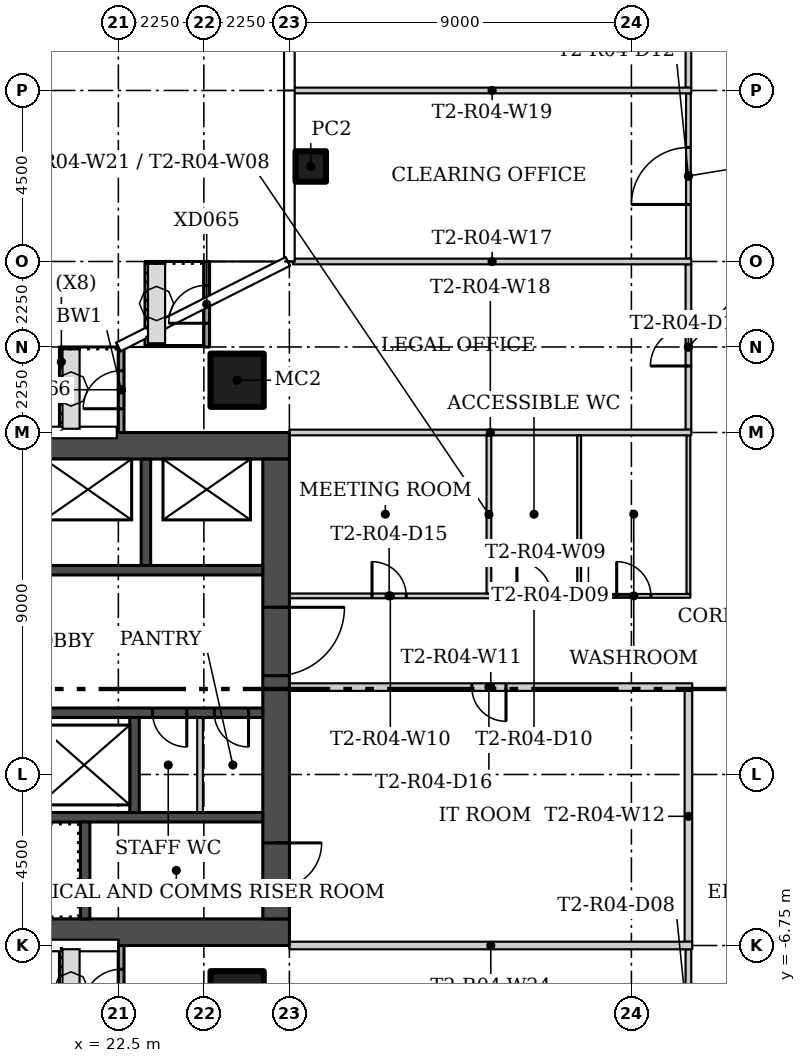
"""IFC4 building model, lengths in metres.
Left out: names, types, materials, properties, quantities, classifications, styles, units other than length and angle.
Written with IfcOpenShell. Run it as: python <this file> out.ifc"""

import sys

from ifc_helpers import new_model, si_unit, direction, frame, frame_2d, origin, origin_2d, place, context, subcontext, project, spatial, rectangle, hollow_rectangle, extrude, element, fill, save


model = new_model("IFC4")
c1 = context("Model", 3, precision=1e-05, world=origin(), true_north=direction((0.0, 1.0)))
c2 = subcontext(c1, "Body", "Model", "MODEL_VIEW")
j1 = project(units=[si_unit("LENGTHUNIT", "METRE"), si_unit("PLANEANGLEUNIT", "RADIAN")], contexts=[c1])
p1 = place(None, origin())
s1 = spatial("IfcSite", under=j1, at=p1, CompositionType="ELEMENT")
p2 = place(p1, origin())
s2 = spatial("IfcBuilding", under=s1, at=p2, CompositionType="ELEMENT")
p3 = place(p2, frame((0.0, 0.0, 53.7)))
s3 = spatial("IfcBuildingStorey", under=s2, at=p3, CompositionType="ELEMENT", Elevation=53.7)
for number, where in (
    (1, (25.625, 8.125, 0.0)),
    (2, (25.625, -8.125, 0.0)),
):
    element("IfcColumn", number, at=place(p3, frame(where)), inside=s3, PredefinedType="COLUMN", context=c2, shape_type="SweptSolid", body=[
        extrude(hollow_rectangle(XDim=1.4, YDim=1.4, WallThickness=0.05, at=origin_2d()), origin(), (0.0, 0.0, 1.0), 3.55),
    ])
p4 = place(p3, frame((27.562, 13.75, 0.0)))
e3 = element("IfcColumn", 3, at=p4, inside=s3, PredefinedType="COLUMN", context=c2, shape_type="SweptSolid", body=[
    extrude(hollow_rectangle(XDim=0.8, YDim=0.8, WallThickness=0.025, at=origin_2d()), origin(), (0.0, 0.0, 1.0), 3.55),
])
p5 = place(p3, frame((37.5, 15.825, 0.0), z_axis=(0.0, 0.0, 1.0), x_axis=(0.0, 1.0, 0.0)))
e4 = element("IfcWall", 4, at=p5, inside=s3, PredefinedType="PARTITIONING", context=c2, shape_type="SweptSolid", body=[
    extrude(rectangle(XDim=8.85, YDim=0.15, at=frame_2d((4.425, 0.0))), origin(), (0.0, 0.0, 1.0), 3.55),
])
p6 = place(p5, frame((3.925, 0.0, 0.0)))
e5 = element("IfcOpeningElement", 5, at=p6, cuts=e4, PredefinedType="OPENING", context=c2, shape_type="SweptSolid", body=[
    extrude(rectangle(XDim=1.0, YDim=2.4, at=frame_2d((0.5, 1.2))), frame((0.0, 0.085, 0.0), z_axis=(0.0, -1.0, 0.0), x_axis=(1.0, 0.0, 0.0)), (0.0, 0.0, 1.0), 0.17),
])
p7 = place(p3, frame((37.5, 6.825, 0.0), z_axis=(0.0, 0.0, 1.0), x_axis=(0.0, 1.0, 0.0)))
e6 = element("IfcWall", 6, at=p7, inside=s3, PredefinedType="PARTITIONING", context=c2, shape_type="SweptSolid", body=[
    extrude(rectangle(XDim=4.35, YDim=0.15, at=frame_2d((2.175, 0.0))), origin(), (0.0, 0.0, 1.0), 3.55),
])
p8 = place(p7, frame((1.675, 0.0, 0.0)))
e7 = element("IfcOpeningElement", 7, at=p8, cuts=e6, PredefinedType="OPENING", context=c2, shape_type="SweptSolid", body=[
    extrude(rectangle(XDim=1.0, YDim=2.4, at=frame_2d((0.5, 1.2))), frame((0.0, 0.085, 0.0), z_axis=(0.0, -1.0, 0.0), x_axis=(1.0, 0.0, 0.0)), (0.0, 0.0, 1.0), 0.17),
])
p9 = place(p3, frame((37.5, -11.175, 0.0), z_axis=(0.0, 0.0, 1.0), x_axis=(0.0, 1.0, 0.0)))
e8 = element("IfcWall", 8, at=p9, inside=s3, PredefinedType="PARTITIONING", context=c2, shape_type="SweptSolid", body=[
    extrude(rectangle(XDim=4.325, YDim=0.15, at=frame_2d((2.163, 0.0))), origin(), (0.0, 0.0, 1.0), 3.55),
])
p10 = place(p9, frame((1.675, 0.0, 0.0)))
e9 = element("IfcOpeningElement", 9, at=p10, cuts=e8, PredefinedType="OPENING", context=c2, shape_type="SweptSolid", body=[
    extrude(rectangle(XDim=1.0, YDim=2.4, at=frame_2d((0.5, 1.2))), frame((0.0, 0.085, 0.0), z_axis=(0.0, -1.0, 0.0), x_axis=(1.0, 0.0, 0.0)), (0.0, 0.0, 1.0), 0.17),
])
p11 = place(p3, frame((37.5, 11.325, 0.0), z_axis=(0.0, 0.0, 1.0), x_axis=(0.0, 1.0, 0.0)))
e10 = element("IfcWall", 10, at=p11, inside=s3, PredefinedType="PARTITIONING", context=c2, shape_type="SweptSolid", body=[
    extrude(rectangle(XDim=4.35, YDim=0.125, at=frame_2d((2.175, 0.0))), origin(), (0.0, 0.0, 1.0), 3.55),
])
p12 = place(p11, frame((1.425, 0.0, 0.0)))
e11 = element("IfcOpeningElement", 11, at=p12, cuts=e10, PredefinedType="OPENING", context=c2, shape_type="SweptSolid", body=[
    extrude(rectangle(XDim=1.5, YDim=2.1, at=frame_2d((0.75, 1.05))), frame((0.0, 0.073, 0.0), z_axis=(0.0, -1.0, 0.0), x_axis=(1.0, 0.0, 0.0)), (0.0, 0.0, 1.0), 0.145),
])
p13 = place(p3, frame((37.5, 2.5, 0.0), z_axis=(0.0, 0.0, 1.0), x_axis=(0.0, 1.0, 0.0)))
e12 = element("IfcWall", 12, at=p13, inside=s3, PredefinedType="PARTITIONING", context=c2, shape_type="SweptSolid", body=[
    extrude(rectangle(XDim=4.175, YDim=0.1, at=frame_2d((2.087, 0.0))), origin(), (0.0, 0.0, 1.0), 3.55),
])
p14 = place(p3, frame((32.188, 2.45, 0.0)))
e13 = element("IfcWall", 13, at=p14, inside=s3, PredefinedType="PARTITIONING", context=c2, shape_type="SweptSolid", body=[
    extrude(rectangle(XDim=5.363, YDim=0.1, at=frame_2d((2.681, 0.0))), origin(), (0.0, 0.0, 1.0), 3.55),
])
p15 = place(p14, frame((3.425, 0.0, 0.0)))
e14 = element("IfcOpeningElement", 14, at=p15, cuts=e13, PredefinedType="OPENING", context=c2, shape_type="SweptSolid", body=[
    extrude(rectangle(XDim=0.9, YDim=2.1, at=frame_2d((0.45, 1.05))), frame((0.0, 0.06, 0.0), z_axis=(0.0, -1.0, 0.0), x_axis=(1.0, 0.0, 0.0)), (0.0, 0.0, 1.0), 0.12),
])
p16 = place(p14, frame((0.8, 0.0, 0.0)))
e15 = element("IfcOpeningElement", 15, at=p16, cuts=e13, PredefinedType="OPENING", context=c2, shape_type="SweptSolid", body=[
    extrude(rectangle(XDim=0.9, YDim=2.1, at=frame_2d((0.45, 1.05))), frame((0.0, 0.06, 0.0), z_axis=(0.0, -1.0, 0.0), x_axis=(1.0, 0.0, 0.0)), (0.0, 0.0, 1.0), 0.12),
])
p17 = place(p3, frame((27.0, 2.45, 0.0)))
e16 = element("IfcWall", 16, at=p17, inside=s3, PredefinedType="PARTITIONING", context=c2, shape_type="SweptSolid", body=[
    extrude(rectangle(XDim=5.312, YDim=0.125, at=frame_2d((2.656, 0.0))), origin(), (0.0, 0.0, 1.0), 3.55),
])
p18 = place(p17, frame((2.175, 0.0, 0.0)))
e17 = element("IfcOpeningElement", 17, at=p18, cuts=e16, PredefinedType="OPENING", context=c2, shape_type="SweptSolid", body=[
    extrude(rectangle(XDim=0.9, YDim=2.1, at=frame_2d((0.45, 1.05))), frame((0.0, 0.073, 0.0), z_axis=(0.0, -1.0, 0.0), x_axis=(1.0, 0.0, 0.0)), (0.0, 0.0, 1.0), 0.145),
])
p19 = place(p3, frame((37.6, 0.05, 0.0), z_axis=(0.0, 0.0, 1.0), x_axis=(-1.0, 0.0, 0.0)))
e18 = element("IfcWall", 18, at=p19, inside=s3, PredefinedType="PARTITIONING", context=c2, shape_type="SweptSolid", body=[
    extrude(rectangle(XDim=10.6, YDim=0.2, at=frame_2d((5.3, 0.0))), origin(), (0.0, 0.0, 1.0), 3.55),
])
p20 = place(p19, frame((4.9, 0.0, 0.0)))
e19 = element("IfcOpeningElement", 19, at=p20, cuts=e18, PredefinedType="OPENING", context=c2, shape_type="SweptSolid", body=[
    extrude(rectangle(XDim=0.9, YDim=2.1, at=frame_2d((0.45, 1.05))), frame((0.0, 0.11, 0.0), z_axis=(0.0, -1.0, 0.0), x_axis=(1.0, 0.0, 0.0)), (0.0, 0.0, 1.0), 0.22),
])
p21 = place(p3, frame((37.5, -6.65, 0.0), z_axis=(0.0, 0.0, 1.0), x_axis=(0.0, 1.0, 0.0)))
e20 = element("IfcWall", 20, at=p21, inside=s3, PredefinedType="PARTITIONING", context=c2, shape_type="SweptSolid", body=[
    extrude(rectangle(XDim=6.6, YDim=0.2, at=frame_2d((3.3, 0.0))), origin(), (0.0, 0.0, 1.0), 3.55),
])
p22 = place(p3, frame((37.575, 11.25, 0.0), z_axis=(0.0, 0.0, 1.0), x_axis=(-1.0, 0.0, 0.0)))
e21 = element("IfcWall", 21, at=p22, inside=s3, PredefinedType="PARTITIONING", context=c2, shape_type="SweptSolid", body=[
    extrude(rectangle(XDim=10.48, YDim=0.15, at=frame_2d((5.24, 0.0))), origin(), (0.0, 0.0, 1.0), 3.55),
])
p23 = place(p3, frame((27.0, 6.75, 0.0)))
e22 = element("IfcWall", 22, at=p23, inside=s3, PredefinedType="PARTITIONING", context=c2, shape_type="SweptSolid", body=[
    extrude(rectangle(XDim=10.575, YDim=0.15, at=frame_2d((5.288, 0.0))), origin(), (0.0, 0.0, 1.0), 3.55),
])
p24 = place(p3, frame((37.575, 15.75, 0.0), z_axis=(0.0, 0.0, 1.0), x_axis=(-1.0, 0.0, 0.0)))
e23 = element("IfcWall", 23, at=p24, inside=s3, PredefinedType="PARTITIONING", context=c2, shape_type="SweptSolid", body=[
    extrude(rectangle(XDim=10.48, YDim=0.15, at=frame_2d((5.24, 0.0))), origin(), (0.0, 0.0, 1.0), 3.55),
])
p25 = place(p3, frame((34.625, 6.675, 0.0), z_axis=(0.0, 0.0, 1.0), x_axis=(0.0, -1.0, 0.0)))
e24 = element("IfcWall", 24, at=p25, inside=s3, PredefinedType="PARTITIONING", context=c2, shape_type="SweptSolid", body=[
    extrude(rectangle(XDim=4.175, YDim=0.1, at=frame_2d((2.087, 0.0))), origin(), (0.0, 0.0, 1.0), 3.55),
])
p26 = place(p3, frame((32.25, 6.675, 0.0), z_axis=(0.0, 0.0, 1.0), x_axis=(0.0, -1.0, 0.0)))
e25 = element("IfcWall", 25, at=p26, inside=s3, PredefinedType="PARTITIONING", context=c2, shape_type="SweptSolid", body=[
    extrude(rectangle(XDim=4.162, YDim=0.125, at=frame_2d((2.081, 0.0))), origin(), (0.0, 0.0, 1.0), 3.55),
])
p27 = place(p3, frame((37.6, -6.75, 0.0), z_axis=(0.0, 0.0, 1.0), x_axis=(-1.0, 0.0, 0.0)))
e26 = element("IfcWall", 26, at=p27, inside=s3, PredefinedType="PARTITIONING", context=c2, shape_type="SweptSolid", body=[
    extrude(rectangle(XDim=10.6, YDim=0.2, at=frame_2d((5.3, 0.0))), origin(), (0.0, 0.0, 1.0), 3.55),
])
p28 = place(p3, frame((24.825, 9.0, 0.0), z_axis=(0.0, 0.0, 1.0), x_axis=(0.0, 1.0, 0.0)))
e27 = element("IfcWall", 27, at=p28, inside=s3, PredefinedType="SOLIDWALL", context=c2, shape_type="SweptSolid", body=[
    extrude(rectangle(XDim=2.25, YDim=0.15, at=frame_2d((1.125, 0.0))), origin(), (0.0, 0.0, 1.0), 3.45),
])
p29 = place(p28, frame((0.625, 0.0, 0.0)))
e28 = element("IfcOpeningElement", 28, at=p29, cuts=e27, PredefinedType="OPENING", context=c2, shape_type="SweptSolid", body=[
    extrude(rectangle(XDim=1.0, YDim=2.4, at=frame_2d((0.5, 1.2))), frame((0.0, 0.085, 0.0), z_axis=(0.0, -1.0, 0.0), x_axis=(1.0, 0.0, 0.0)), (0.0, 0.0, 1.0), 0.17),
])
p30 = place(p3, frame((22.575, 6.743, 0.0), z_axis=(0.0, 0.0, 1.0), x_axis=(0.0, 1.0, 0.0)))
e29 = element("IfcWall", 29, at=p30, inside=s3, PredefinedType="SOLIDWALL", context=c2, shape_type="SweptSolid", body=[
    extrude(rectangle(XDim=2.257, YDim=0.15, at=frame_2d((1.128, 0.0))), origin(), (0.0, 0.0, 1.0), 3.45),
])
p31 = place(p30, frame((0.632, 0.0, 0.0)))
e30 = element("IfcOpeningElement", 30, at=p31, cuts=e29, PredefinedType="OPENING", context=c2, shape_type="SweptSolid", body=[
    extrude(rectangle(XDim=1.0, YDim=2.4, at=frame_2d((0.5, 1.2))), frame((0.0, 0.085, 0.0), z_axis=(0.0, -1.0, 0.0), x_axis=(1.0, 0.0, 0.0)), (0.0, 0.0, 1.0), 0.17),
])
p32 = place(p3, frame((22.575, -9.0, 0.0), z_axis=(0.0, 0.0, 1.0), x_axis=(0.0, 1.0, 0.0)))
e31 = element("IfcWall", 31, at=p32, inside=s3, PredefinedType="SOLIDWALL", context=c2, shape_type="SweptSolid", body=[
    extrude(rectangle(XDim=2.257, YDim=0.15, at=frame_2d((1.128, 0.0))), origin(), (0.0, 0.0, 1.0), 3.45),
])
p33 = place(p32, frame((0.625, 0.0, 0.0)))
e32 = element("IfcOpeningElement", 32, at=p33, cuts=e31, PredefinedType="OPENING", context=c2, shape_type="SweptSolid", body=[
    extrude(rectangle(XDim=1.0, YDim=2.4, at=frame_2d((0.5, 1.2))), frame((0.0, 0.085, 0.0), z_axis=(0.0, -1.0, 0.0), x_axis=(1.0, 0.0, 0.0)), (0.0, 0.0, 1.0), 0.17),
])
for number, where in (
    (33, (13.5, -6.4, 0.0)),
    (34, (13.5, 6.4, 0.0)),
):
    element("IfcWall", number, at=place(p3, frame(where)), inside=s3, PredefinedType="SHEAR", context=c2, shape_type="SweptSolid", body=[
        extrude(rectangle(XDim=13.5, YDim=0.7, at=frame_2d((6.75, 0.0))), origin(), (0.0, 0.0, 1.0), 3.55),
    ])
p34 = place(p3, frame((26.65, 6.05, 0.0), z_axis=(0.0, 0.0, 1.0), x_axis=(0.0, -1.0, 0.0)))
e35 = element("IfcWall", 35, at=p34, inside=s3, PredefinedType="SHEAR", context=c2, shape_type="SweptSolid", body=[
    extrude(rectangle(XDim=12.1, YDim=0.7, at=frame_2d((6.05, 0.0))), origin(), (0.0, 0.0, 1.0), 3.55),
])
p35 = place(p34, frame((10.1, 0.0, 0.0)))
e36 = element("IfcOpeningElement", 36, at=p35, cuts=e35, PredefinedType="OPENING", context=c2, shape_type="SweptSolid", body=[
    extrude(rectangle(XDim=1.2, YDim=2.1, at=frame_2d((0.6, 1.05))), frame((0.0, 0.36, 0.0), z_axis=(0.0, -1.0, 0.0), x_axis=(1.0, 0.0, 0.0)), (0.0, 0.0, 1.0), 0.72),
])
p36 = place(p34, frame((3.9, 0.0, 0.0)))
e37 = element("IfcOpeningElement", 37, at=p36, cuts=e35, PredefinedType="OPENING", context=c2, shape_type="SweptSolid", body=[
    extrude(rectangle(XDim=1.8, YDim=2.4, at=frame_2d((0.9, 1.2))), frame((0.0, 0.36, 0.0), z_axis=(0.0, -1.0, 0.0), x_axis=(1.0, 0.0, 0.0)), (0.0, 0.0, 1.0), 0.72),
])
p37 = place(p3, frame((26.3, -3.375, 0.0), z_axis=(0.0, 0.0, 1.0), x_axis=(-1.0, 0.0, 0.0)))
e38 = element("IfcWall", 38, at=p37, inside=s3, PredefinedType="SHEAR", context=c2, shape_type="SweptSolid", body=[
    extrude(rectangle(XDim=12.1, YDim=0.25, at=frame_2d((6.05, 0.0))), origin(), (0.0, 0.0, 1.0), 3.55),
])
p38 = place(p37, frame((10.95, 0.0, 0.0)))
e39 = element("IfcOpeningElement", 39, at=p38, cuts=e38, PredefinedType="OPENING", context=c2, shape_type="SweptSolid", body=[
    extrude(rectangle(XDim=1.1, YDim=2.1, at=frame_2d((0.55, 1.05))), frame((0.0, 0.135, 0.0), z_axis=(0.0, -1.0, 0.0), x_axis=(1.0, 0.0, 0.0)), (0.0, 0.0, 1.0), 0.27),
])
p39 = place(p3, frame((21.625, -6.05, 0.0), z_axis=(0.0, 0.0, 1.0), x_axis=(0.0, 1.0, 0.0)))
e40 = element("IfcWall", 40, at=p39, inside=s3, PredefinedType="SHEAR", context=c2, shape_type="SweptSolid", body=[
    extrude(rectangle(XDim=2.55, YDim=0.25, at=frame_2d((1.275, 0.0))), origin(), (0.0, 0.0, 1.0), 3.55),
])
p40 = place(p3, frame((26.3, -0.625, 0.0), z_axis=(0.0, 0.0, 1.0), x_axis=(-1.0, 0.0, 0.0)))
e41 = element("IfcWall", 41, at=p40, inside=s3, PredefinedType="SHEAR", context=c2, shape_type="SweptSolid", body=[
    extrude(rectangle(XDim=12.1, YDim=0.25, at=frame_2d((6.05, 0.0))), origin(), (0.0, 0.0, 1.0), 3.55),
])
p41 = place(p40, frame((8.65, 0.0, 0.0)))
e42 = element("IfcOpeningElement", 42, at=p41, cuts=e41, PredefinedType="OPENING", context=c2, shape_type="SweptSolid", body=[
    extrude(rectangle(XDim=1.2, YDim=2.1, at=frame_2d((0.6, 1.05))), frame((0.0, 0.135, 0.0), z_axis=(0.0, -1.0, 0.0), x_axis=(1.0, 0.0, 0.0)), (0.0, 0.0, 1.0), 0.27),
])
p42 = place(p40, frame((2.0, 0.0, 0.0)))
e43 = element("IfcOpeningElement", 43, at=p42, cuts=e41, PredefinedType="OPENING", context=c2, shape_type="SweptSolid", body=[
    extrude(rectangle(XDim=0.9, YDim=2.1, at=frame_2d((0.45, 1.05))), frame((0.0, 0.135, 0.0), z_axis=(0.0, -1.0, 0.0), x_axis=(1.0, 0.0, 0.0)), (0.0, 0.0, 1.0), 0.27),
])
p43 = place(p40, frame((0.375, 0.0, 0.0)))
e44 = element("IfcOpeningElement", 44, at=p43, cuts=e41, PredefinedType="OPENING", context=c2, shape_type="SweptSolid", body=[
    extrude(rectangle(XDim=0.9, YDim=2.1, at=frame_2d((0.45, 1.05))), frame((0.0, 0.135, 0.0), z_axis=(0.0, -1.0, 0.0), x_axis=(1.0, 0.0, 0.0)), (0.0, 0.0, 1.0), 0.27),
])
p44 = place(p3, frame((22.925, -3.25, 0.0), z_axis=(0.0, 0.0, 1.0), x_axis=(0.0, 1.0, 0.0)))
e45 = element("IfcWall", 45, at=p44, inside=s3, PredefinedType="SHEAR", context=c2, shape_type="SweptSolid", body=[
    extrude(rectangle(XDim=2.5, YDim=0.25, at=frame_2d((1.25, 0.0))), origin(), (0.0, 0.0, 1.0), 3.55),
])
p45 = place(p3, frame((24.65, -3.25, 0.0), z_axis=(0.0, 0.0, 1.0), x_axis=(0.0, 1.0, 0.0)))
e46 = element("IfcWall", 46, at=p45, inside=s3, PredefinedType="PARTITIONING", context=c2, shape_type="SweptSolid", body=[
    extrude(rectangle(XDim=2.5, YDim=0.15, at=frame_2d((1.25, 0.0))), origin(), (0.0, 0.0, 1.0), 3.55),
])
p46 = place(p3, frame((14.2, 3.125, 0.0)))
e47 = element("IfcWall", 47, at=p46, inside=s3, PredefinedType="SHEAR", context=c2, shape_type="SweptSolid", body=[
    extrude(rectangle(XDim=12.1, YDim=0.25, at=frame_2d((6.05, 0.0))), origin(), (0.0, 0.0, 1.0), 3.55),
])
p47 = place(p46, frame((0.85, 0.0, 0.0)))
e48 = element("IfcOpeningElement", 48, at=p47, cuts=e47, PredefinedType="OPENING", context=c2, shape_type="SweptSolid", body=[
    extrude(rectangle(XDim=1.1, YDim=2.1, at=frame_2d((0.55, 1.05))), frame((0.0, 0.135, 0.0), z_axis=(0.0, -1.0, 0.0), x_axis=(1.0, 0.0, 0.0)), (0.0, 0.0, 1.0), 0.27),
])
p48 = place(p46, frame((3.9, 0.0, 0.0)))
e49 = element("IfcOpeningElement", 49, at=p48, cuts=e47, PredefinedType="OPENING", context=c2, shape_type="SweptSolid", body=[
    extrude(rectangle(XDim=1.1, YDim=2.1, at=frame_2d((0.55, 1.05))), frame((0.0, 0.135, 0.0), z_axis=(0.0, -1.0, 0.0), x_axis=(1.0, 0.0, 0.0)), (0.0, 0.0, 1.0), 0.27),
])
p49 = place(p3, frame((23.225, 3.25, 0.0), z_axis=(0.0, 0.0, 1.0), x_axis=(0.0, 1.0, 0.0)))
e50 = element("IfcWall", 50, at=p49, inside=s3, PredefinedType="SHEAR", context=c2, shape_type="SweptSolid", body=[
    extrude(rectangle(XDim=2.8, YDim=0.25, at=frame_2d((1.4, 0.0))), origin(), (0.0, 0.0, 1.0), 3.55),
])
p50 = place(p15, origin())
e51 = element("IfcDoor", 51, at=p50, inside=s3, OperationType="SINGLE_SWING_RIGHT", PredefinedType="DOOR", context=c2, shape_type="SweptSolid", body=[
    extrude(rectangle(XDim=0.9, YDim=2.1, at=frame_2d((0.45, 1.05))), frame((0.0, 0.025, 0.0), z_axis=(0.0, -1.0, 0.0), x_axis=(1.0, 0.0, 0.0)), (0.0, 0.0, 1.0), 0.05),
])
fill(e14, e51)
p51 = place(p16, origin())
e52 = element("IfcDoor", 52, at=p51, inside=s3, OperationType="SINGLE_SWING_RIGHT", PredefinedType="DOOR", context=c2, shape_type="SweptSolid", body=[
    extrude(rectangle(XDim=0.9, YDim=2.1, at=frame_2d((0.45, 1.05))), frame((0.0, 0.025, 0.0), z_axis=(0.0, -1.0, 0.0), x_axis=(1.0, 0.0, 0.0)), (0.0, 0.0, 1.0), 0.05),
])
fill(e15, e52)
p52 = place(p8, origin())
e53 = element("IfcDoor", 53, at=p52, inside=s3, OperationType="SINGLE_SWING_RIGHT", PredefinedType="DOOR", context=c2, shape_type="SweptSolid", body=[
    extrude(rectangle(XDim=1.0, YDim=2.4, at=frame_2d((0.5, 1.2))), frame((0.0, 0.025, 0.0), z_axis=(0.0, -1.0, 0.0), x_axis=(1.0, 0.0, 0.0)), (0.0, 0.0, 1.0), 0.05),
])
fill(e7, e53)
p53 = place(p12, origin())
e54 = element("IfcDoor", 54, at=p53, inside=s3, OperationType="DOUBLE_DOOR_SINGLE_SWING", PredefinedType="DOOR", context=c2, shape_type="SweptSolid", body=[
    extrude(rectangle(XDim=1.5, YDim=2.1, at=frame_2d((0.75, 1.05))), frame((0.0, 0.025, 0.0), z_axis=(0.0, -1.0, 0.0), x_axis=(1.0, 0.0, 0.0)), (0.0, 0.0, 1.0), 0.05),
])
fill(e11, e54)
p54 = place(p18, origin())
e55 = element("IfcDoor", 55, at=p54, inside=s3, OperationType="SINGLE_SWING_LEFT", PredefinedType="DOOR", context=c2, shape_type="SweptSolid", body=[
    extrude(rectangle(XDim=0.9, YDim=2.1, at=frame_2d((0.45, 1.05))), frame((0.0, 0.025, 0.0), z_axis=(0.0, -1.0, 0.0), x_axis=(1.0, 0.0, 0.0)), (0.0, 0.0, 1.0), 0.05),
])
fill(e17, e55)
p55 = place(p20, origin())
e56 = element("IfcDoor", 56, at=p55, inside=s3, OperationType="SINGLE_SWING_RIGHT", PredefinedType="DOOR", context=c2, shape_type="SweptSolid", body=[
    extrude(rectangle(XDim=0.9, YDim=2.1, at=frame_2d((0.45, 1.05))), frame((0.0, 0.025, 0.0), z_axis=(0.0, -1.0, 0.0), x_axis=(1.0, 0.0, 0.0)), (0.0, 0.0, 1.0), 0.05),
])
fill(e19, e56)
p56 = place(p29, origin())
e57 = element("IfcDoor", 57, at=p56, inside=s3, OperationType="SINGLE_SWING_RIGHT", PredefinedType="DOOR", context=c2, shape_type="SweptSolid", body=[
    extrude(rectangle(XDim=1.0, YDim=2.4, at=frame_2d((0.5, 1.2))), frame((0.0, 0.025, 0.0), z_axis=(0.0, -1.0, 0.0), x_axis=(1.0, 0.0, 0.0)), (0.0, 0.0, 1.0), 0.05),
])
fill(e28, e57)
p57 = place(p31, origin())
e58 = element("IfcDoor", 58, at=p57, inside=s3, OperationType="SINGLE_SWING_LEFT", PredefinedType="DOOR", context=c2, shape_type="SweptSolid", body=[
    extrude(rectangle(XDim=1.0, YDim=2.4, at=frame_2d((0.5, 1.2))), frame((0.0, 0.025, 0.0), z_axis=(0.0, -1.0, 0.0), x_axis=(1.0, 0.0, 0.0)), (0.0, 0.0, 1.0), 0.05),
])
fill(e30, e58)
p58 = place(p33, origin())
e59 = element("IfcDoor", 59, at=p58, inside=s3, OperationType="SINGLE_SWING_LEFT", PredefinedType="DOOR", context=c2, shape_type="SweptSolid", body=[
    extrude(rectangle(XDim=1.0, YDim=2.4, at=frame_2d((0.5, 1.2))), frame((0.0, 0.025, 0.0), z_axis=(0.0, -1.0, 0.0), x_axis=(1.0, 0.0, 0.0)), (0.0, 0.0, 1.0), 0.05),
])
fill(e32, e59)
p59 = place(p35, origin())
e60 = element("IfcDoor", 60, at=p59, inside=s3, OperationType="SINGLE_SWING_RIGHT", PredefinedType="DOOR", context=c2, shape_type="SweptSolid", body=[
    extrude(rectangle(XDim=1.2, YDim=2.1, at=frame_2d((0.6, 1.05))), frame((0.0, 0.025, 0.0), z_axis=(0.0, -1.0, 0.0), x_axis=(1.0, 0.0, 0.0)), (0.0, 0.0, 1.0), 0.05),
])
fill(e36, e60)
p60 = place(p36, origin())
e61 = element("IfcDoor", 61, at=p60, inside=s3, OperationType="DOUBLE_DOOR_SINGLE_SWING", PredefinedType="DOOR", context=c2, shape_type="SweptSolid", body=[
    extrude(rectangle(XDim=1.8, YDim=2.4, at=frame_2d((0.9, 1.2))), frame((0.0, 0.025, 0.0), z_axis=(0.0, -1.0, 0.0), x_axis=(1.0, 0.0, 0.0)), (0.0, 0.0, 1.0), 0.05),
])
fill(e37, e61)
p61 = place(p42, origin())
e62 = element("IfcDoor", 62, at=p61, inside=s3, OperationType="SINGLE_SWING_LEFT", PredefinedType="DOOR", context=c2, shape_type="SweptSolid", body=[
    extrude(rectangle(XDim=0.9, YDim=2.1, at=frame_2d((0.45, 1.05))), frame((0.0, 0.025, 0.0), z_axis=(0.0, -1.0, 0.0), x_axis=(1.0, 0.0, 0.0)), (0.0, 0.0, 1.0), 0.05),
])
fill(e43, e62)
p62 = place(p43, origin())
e63 = element("IfcDoor", 63, at=p62, inside=s3, OperationType="SINGLE_SWING_LEFT", PredefinedType="DOOR", context=c2, shape_type="SweptSolid", body=[
    extrude(rectangle(XDim=0.9, YDim=2.1, at=frame_2d((0.45, 1.05))), frame((0.0, 0.025, 0.0), z_axis=(0.0, -1.0, 0.0), x_axis=(1.0, 0.0, 0.0)), (0.0, 0.0, 1.0), 0.05),
])
fill(e44, e63)
save(model, sys.argv[1])
